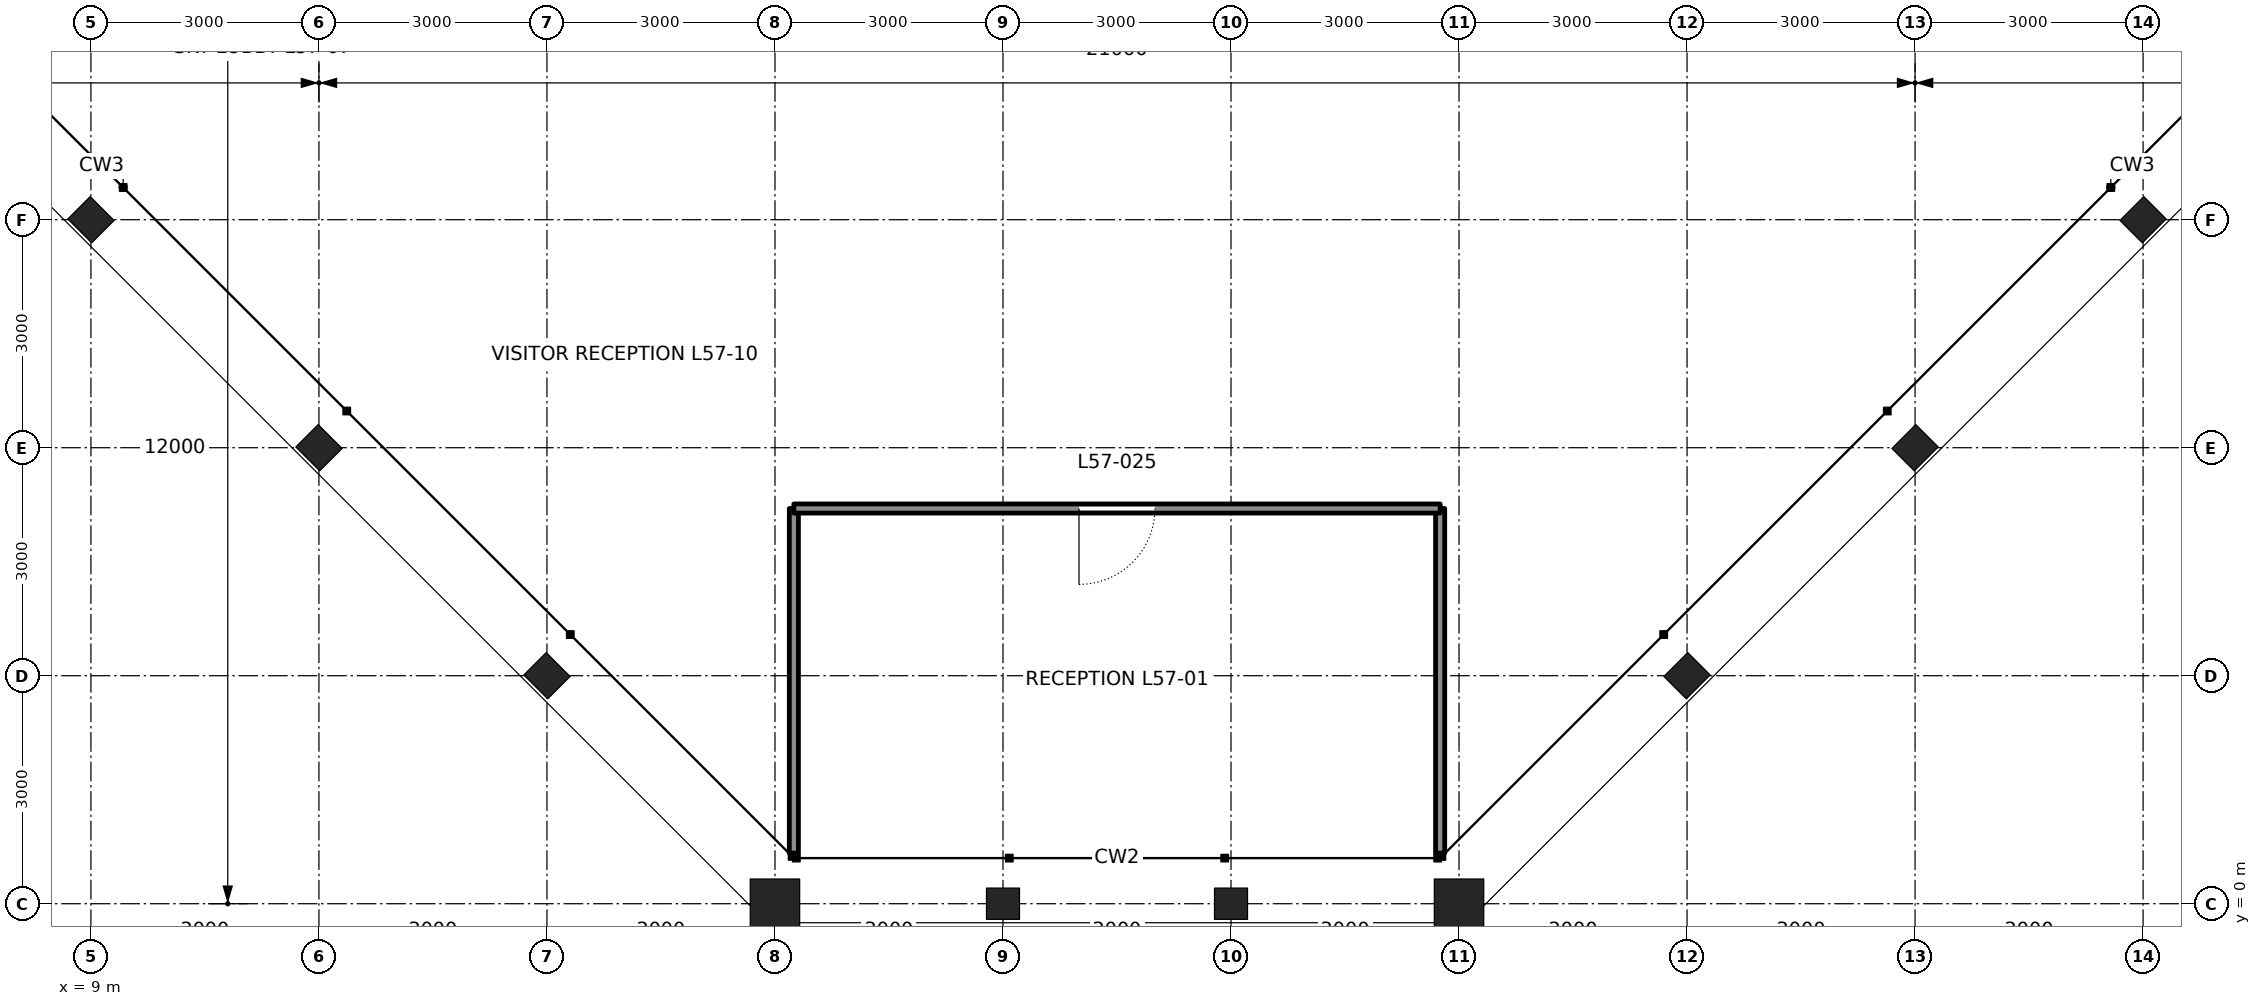
"""IFC4 building model, lengths in metres.
Left out: names, types, materials, properties, quantities, classifications, styles, units other than length and angle.
Written with IfcOpenShell. Run it as: python <this file> out.ifc"""

import sys

from ifc_helpers import new_model, si_unit, direction, frame, frame_2d, origin, origin_2d, place, context, subcontext, project, spatial, rectangle, hollow_rectangle, i_section, extrude, element, fill, save


model = new_model("IFC4")
c1 = context("Model", 3, precision=1e-05, world=origin(), true_north=direction((0.0, 1.0)))
c2 = subcontext(c1, "Body", "Model", "MODEL_VIEW")
j1 = project(units=[si_unit("LENGTHUNIT", "METRE"), si_unit("PLANEANGLEUNIT", "RADIAN")], contexts=[c1])
p1 = place(None, origin())
s1 = spatial("IfcSite", under=j1, at=p1, CompositionType="ELEMENT")
p2 = place(p1, origin())
s2 = spatial("IfcBuilding", under=s1, at=p2, CompositionType="ELEMENT")
p3 = place(p2, frame((0.0, 0.0, 257.7)))
s3 = spatial("IfcBuildingStorey", under=s2, at=p3, CompositionType="ELEMENT", Elevation=257.7)
p4 = place(p3, frame((18.0, 0.0, 0.0), z_axis=(0.0, 0.0, 1.0), x_axis=(0.0, -1.0, 0.0)))
e1 = element("IfcColumn", 1, at=p4, inside=s3, PredefinedType="COLUMN", context=c2, shape_type="SweptSolid", body=[
    extrude(hollow_rectangle(XDim=0.65, YDim=0.65, WallThickness=0.065, at=origin_2d()), origin(), (0.0, 0.0, 1.0), 4.5),
])
for number, where, z_axis, x_axis in (
    (2, (21.0, 0.0, 0.0), (0.0, 0.0, 1.0), (0.0, -1.0, 0.0)),
    (3, (24.0, 0.0, 0.0), (0.0, 0.0, 1.0), (0.0, -1.0, 0.0)),
):
    element("IfcColumn", number, at=place(p3, frame(where, z_axis=z_axis, x_axis=x_axis)), inside=s3, PredefinedType="COLUMN", context=c2, shape_type="SweptSolid", body=[
        extrude(i_section(OverallWidth=0.411, OverallDepth=0.434, WebThickness=0.036, FlangeThickness=0.057, at=origin_2d()), origin(), (0.0, 0.0, 1.0), 4.5),
    ])
p5 = place(p3, frame((27.0, 0.0, 0.0), z_axis=(0.0, 0.0, 1.0), x_axis=(0.0, -1.0, 0.0)))
e4 = element("IfcColumn", 4, at=p5, inside=s3, PredefinedType="COLUMN", context=c2, shape_type="SweptSolid", body=[
    extrude(hollow_rectangle(XDim=0.65, YDim=0.65, WallThickness=0.065, at=origin_2d()), origin(), (0.0, 0.0, 1.0), 4.5),
])
for number, where, z_axis, x_axis in (
    (5, (30.0, 3.0, -0.91), (0.0, 0.0, 1.0), (0.707, -0.707, 0.0)),
    (6, (33.0, 6.0, -0.91), (0.0, 0.0, 1.0), (0.707, -0.707, 0.0)),
    (7, (36.0, 9.0, -0.91), (0.0, 0.0, 1.0), (0.707, -0.707, 0.0)),
):
    element("IfcColumn", number, at=place(p3, frame(where, z_axis=z_axis, x_axis=x_axis)), inside=s3, PredefinedType="COLUMN", context=c2, shape_type="SweptSolid", body=[
        extrude(i_section(OverallWidth=0.417, OverallDepth=0.445, WebThickness=0.039, FlangeThickness=0.063, at=origin_2d()), origin(), (0.0, 0.0, 1.0), 5.41),
    ])
for number, where, z_axis, x_axis in (
    (8, (9.0, 9.0, 0.0), (0.0, 0.0, 1.0), (-0.707, -0.707, 0.0)),
    (9, (12.0, 6.0, 0.0), (0.0, 0.0, 1.0), (-0.707, -0.707, 0.0)),
    (10, (15.0, 3.0, 0.0), (0.0, 0.0, 1.0), (-0.707, -0.707, 0.0)),
):
    element("IfcColumn", number, at=place(p3, frame(where, z_axis=z_axis, x_axis=x_axis)), inside=s3, PredefinedType="COLUMN", context=c2, shape_type="SweptSolid", body=[
        extrude(i_section(OverallWidth=0.417, OverallDepth=0.445, WebThickness=0.039, FlangeThickness=0.063, at=origin_2d()), origin(), (0.0, 0.0, 1.0), 4.5),
    ])
for number, where, z_axis, x_axis in (
    (11, (18.249, 0.666, 0.0), (0.0, 0.0, 1.0), (0.0, 1.0, 0.0)),
    (12, (26.751, 0.666, 0.0), (0.0, 0.0, 1.0), (0.0, 1.0, 0.0)),
):
    element("IfcWall", number, at=place(p3, frame(where, z_axis=z_axis, x_axis=x_axis)), inside=s3, PredefinedType="PARTITIONING", context=c2, shape_type="SweptSolid", body=[
        extrude(rectangle(XDim=4.534, YDim=0.12, at=frame_2d((2.267, 0.0))), origin(), (0.0, 0.0, 1.0), 4.34),
    ])
p6 = place(p3, frame((18.249, 5.2, 0.0), z_axis=(0.0, 0.0, 1.0), x_axis=(1.0, 0.0, 0.0)))
e13 = element("IfcWall", 13, at=p6, inside=s3, PredefinedType="PARTITIONING", context=c2, shape_type="SweptSolid", body=[
    extrude(rectangle(XDim=8.503, YDim=0.12, at=frame_2d((4.251, 0.0))), origin(), (0.0, 0.0, 1.0), 4.34),
])
p7 = place(p6, frame((3.751, 0.0, 0.0)))
e14 = element("IfcOpeningElement", 14, at=p7, cuts=e13, PredefinedType="OPENING", context=c2, shape_type="SweptSolid", body=[
    extrude(rectangle(XDim=1.0, YDim=2.4, at=frame_2d((0.5, 1.2))), frame((0.0, 0.07, 0.0), z_axis=(0.0, -1.0, 0.0), x_axis=(1.0, 0.0, 0.0)), (0.0, 0.0, 1.0), 0.14),
])
p8 = place(p7, frame((1.0, 0.0, 0.0), z_axis=(0.0, 0.0, 1.0), x_axis=(-1.0, 0.0, 0.0)))
e15 = element("IfcDoor", 15, at=p8, inside=s3, OperationType="SINGLE_SWING_RIGHT", PredefinedType="DOOR", context=c2, shape_type="SweptSolid", body=[
    extrude(rectangle(XDim=1.0, YDim=2.4, at=frame_2d((0.5, 1.2))), frame((0.0, 0.025, 0.0), z_axis=(0.0, -1.0, 0.0), x_axis=(1.0, 0.0, 0.0)), (0.0, 0.0, 1.0), 0.05),
])
fill(e14, e15)
save(model, sys.argv[1])
